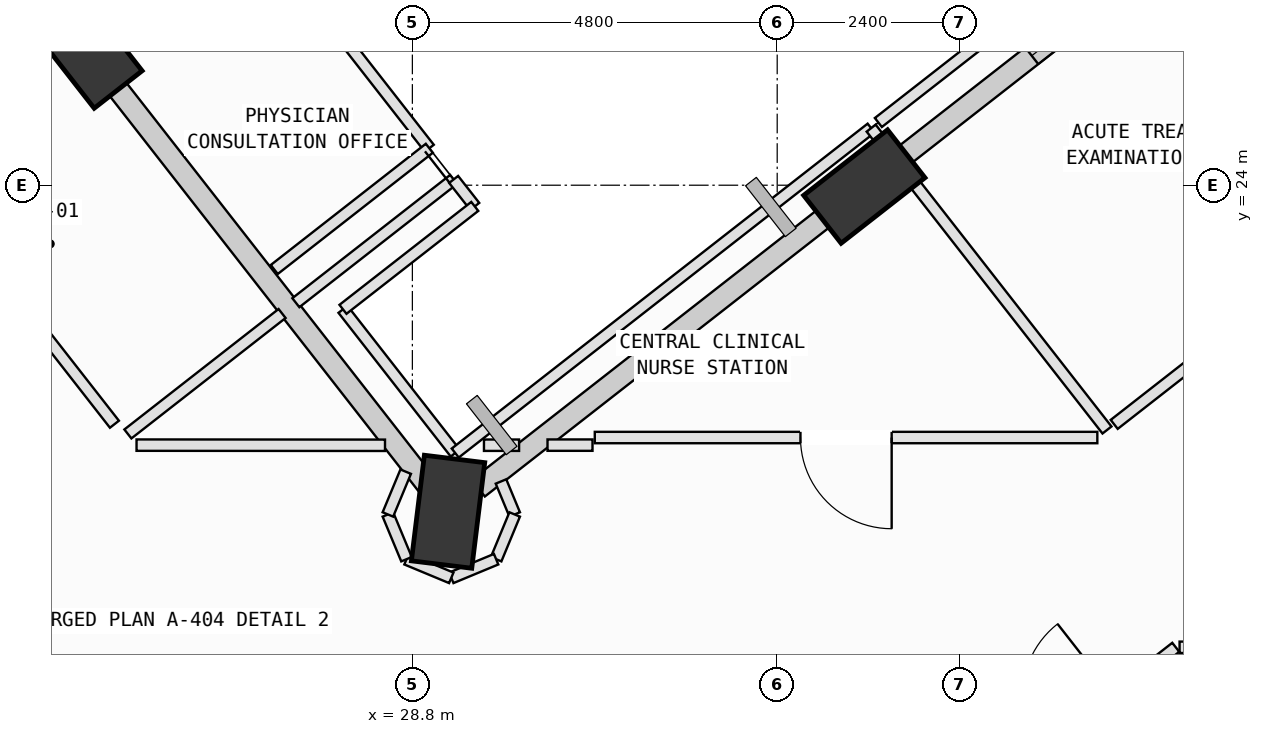
"""IFC4 building model, lengths in metres.
Left out: names, types, materials, properties, quantities, classifications, styles, units other than length and angle.
Written with IfcOpenShell. Run it as: python <this file> out.ifc"""

import sys

from ifc_helpers import new_model, si_unit, direction, frame, frame_2d, origin, origin_2d, place, context, subcontext, project, spatial, rectangle, extrude, element, fill, save


model = new_model("IFC4")
c1 = context("Model", 3, precision=1e-05, world=origin(), true_north=direction((0.0, 1.0)))
c2 = subcontext(c1, "Body", "Model", "MODEL_VIEW")
j1 = project(units=[si_unit("LENGTHUNIT", "METRE"), si_unit("PLANEANGLEUNIT", "RADIAN")], contexts=[c1])
p1 = place(None, origin())
s1 = spatial("IfcSite", under=j1, at=p1, CompositionType="ELEMENT")
p2 = place(p1, origin())
s2 = spatial("IfcBuilding", under=s1, at=p2, CompositionType="ELEMENT")
p3 = place(p2, frame((0.0, 0.0, 185.8)))
s3 = spatial("IfcBuildingStorey", under=s2, at=p3, CompositionType="ELEMENT", Elevation=185.8)
p4 = place(p3, frame((34.746, 23.982, 0.002), z_axis=(0.003359952663, 0.004765023776, 0.999983002489), x_axis=(-0.99879049006, -0.049037451332, 0.003589614403)))
e1 = element("IfcColumn", 1, at=p4, inside=s3, PredefinedType="COLUMN", context=c2, shape_type="SweptSolid", body=[
    extrude(rectangle(XDim=1.4, YDim=0.8, at=origin_2d()), origin(), (0.0, 0.0, 1.0), 3.996),
])
p5 = place(p3, frame((29.27, 19.704, 0.002), z_axis=(0.021251539031, -0.0177706835, 0.999616213802), x_axis=(-0.682948414235, 0.729948927181, 0.027495948803)))
e2 = element("IfcColumn", 2, at=p5, inside=s3, PredefinedType="COLUMN", context=c2, shape_type="SweptSolid", body=[
    extrude(rectangle(XDim=1.4, YDim=0.8, at=origin_2d()), origin(), (0.0, 0.0, 1.0), 3.998),
])
p6 = place(p3, frame((24.498, 25.811, 0.002), z_axis=(-0.003845969984, -0.037727134127, 0.99928067722), x_axis=(-0.532627653931, 0.845821943945, 0.029883463813)))
e3 = element("IfcColumn", 3, at=p6, inside=s3, PredefinedType="COLUMN", context=c2, shape_type="SweptSolid", body=[
    extrude(rectangle(XDim=1.4, YDim=0.8, at=origin_2d()), origin(), (0.0, 0.0, 1.0), 3.999),
])
p7 = place(p3, frame((35.146, 24.295, 0.0), z_axis=(0.0, 0.0, 1.0), x_axis=(0.787999939923, 0.615675315959, 0.0)))
e4 = element("IfcWall", 4, at=p7, inside=s3, PredefinedType="SOLIDWALL", context=c2, shape_type="SweptSolid", body=[
    extrude(rectangle(XDim=6.211, YDim=0.28, at=frame_2d((3.105, 0.0))), origin(), (0.0, 0.0, 1.0), 3.265),
])
p8 = place(p7, frame((2.288, 0.0, 0.75)))
e5 = element("IfcOpeningElement", 5, at=p8, cuts=e4, PredefinedType="OPENING", context=c2, shape_type="SweptSolid", body=[
    extrude(rectangle(XDim=2.0, YDim=1.95, at=frame_2d((1.0, 0.975))), frame((0.0, 0.15, 0.0), z_axis=(0.0, -1.0, 0.0), x_axis=(1.0, 0.0, 0.0)), (0.0, 0.0, 1.0), 0.3),
])
p9 = place(p3, frame((29.667, 20.014, 0.0), z_axis=(0.0, 0.0, 1.0), x_axis=(0.788002637329, 0.615671863547, 0.0)))
e6 = element("IfcWall", 6, at=p9, inside=s3, PredefinedType="SOLIDWALL", context=c2, shape_type="SweptSolid", body=[
    extrude(rectangle(XDim=5.96, YDim=0.28, at=frame_2d((2.98, 0.0))), origin(), (0.0, 0.0, 1.0), 3.265),
])
p10 = place(p3, frame((28.998, 20.052, 0.0), z_axis=(0.0, 0.0, 1.0), x_axis=(-0.615664366432, 0.788008494819, 0.0)))
e7 = element("IfcWall", 7, at=p10, inside=s3, PredefinedType="SOLIDWALL", context=c2, shape_type="SweptSolid", body=[
    extrude(rectangle(XDim=6.76, YDim=0.28, at=frame_2d((3.38, 0.0))), origin(), (0.0, 0.0, 1.0), 3.265),
])
p11 = place(p3, frame((35.726, 15.484, 0.0), z_axis=(0.0, 0.0, 1.0), x_axis=(0.788004728752, 0.615669186711, 0.0)))
e8 = element("IfcWall", 8, at=p11, inside=s3, PredefinedType="PARTITIONING", context=c2, shape_type="SweptSolid", body=[
    extrude(rectangle(XDim=3.957, YDim=0.15, at=frame_2d((1.979, 0.0))), origin(), (0.0, 0.0, 1.0), 3.78),
])
p12 = place(p11, frame((1.72, 0.0, 0.0)))
e9 = element("IfcOpeningElement", 9, at=p12, cuts=e8, PredefinedType="OPENING", context=c2, shape_type="SweptSolid", body=[
    extrude(rectangle(XDim=1.2, YDim=2.15, at=frame_2d((0.6, 1.075))), frame((0.0, 0.085, 0.0), z_axis=(0.0, -1.0, 0.0), x_axis=(1.0, 0.0, 0.0)), (0.0, 0.0, 1.0), 0.17),
])
p13 = place(p3, frame((38.894, 17.92, 0.0), z_axis=(0.0, 0.0, 1.0), x_axis=(1.0, 0.0, 0.0)))
e10 = element("IfcWall", 10, at=p13, inside=s3, PredefinedType="PARTITIONING", context=c2, shape_type="SweptSolid", body=[
    extrude(rectangle(XDim=2.296, YDim=0.15, at=frame_2d((1.148, 0.0))), origin(), (0.0, 0.0, 1.0), 3.78),
])
p14 = place(p3, frame((27.887, 22.367, 0.0), z_axis=(0.0, 0.0, 1.0), x_axis=(0.615594676938, -0.788062937667, 0.0)))
e11 = element("IfcWall", 11, at=p14, inside=s3, PredefinedType="PARTITIONING", context=c2, shape_type="SweptSolid", body=[
    extrude(rectangle(XDim=2.399, YDim=0.15, at=frame_2d((1.2, 0.0))), origin(), (0.0, 0.0, 1.0), 3.78),
])
p15 = place(p3, frame((29.364, 20.476, 0.0), z_axis=(0.0, 0.0, 1.0), x_axis=(0.788027038921, 0.615640630505, 0.0)))
e12 = element("IfcWall", 12, at=p15, inside=s3, PredefinedType="PARTITIONING", context=c2, shape_type="SweptSolid", body=[
    extrude(rectangle(XDim=6.944, YDim=0.15, at=frame_2d((3.472, 0.0))), origin(), (0.0, 0.0, 1.0), 3.78),
])
p16 = place(p3, frame((34.836, 24.751, 0.0), z_axis=(0.0, 0.0, 1.0), x_axis=(0.615763745793, -0.787930840472, 0.0)))
e13 = element("IfcWall", 13, at=p16, inside=s3, PredefinedType="PARTITIONING", context=c2, shape_type="SweptSolid", body=[
    extrude(rectangle(XDim=0.435, YDim=0.15, at=frame_2d((0.218, 0.0))), origin(), (0.0, 0.0, 1.0), 3.78),
])
p17 = place(p3, frame((35.246, 24.227, 0.0), z_axis=(0.0, 0.0, 1.0), x_axis=(0.615519498699, -0.78812165731, 0.0)))
e14 = element("IfcWall", 14, at=p17, inside=s3, PredefinedType="PARTITIONING", context=c2, shape_type="SweptSolid", body=[
    extrude(rectangle(XDim=4.375, YDim=0.15, at=frame_2d((2.188, 0.0))), origin(), (0.0, 0.0, 1.0), 3.78),
])
p18 = place(p3, frame((37.812, 20.68, 0.0), z_axis=(0.0, 0.0, 1.0), x_axis=(-1.0, 0.0, 0.0)))
e15 = element("IfcWall", 15, at=p18, inside=s3, PredefinedType="PARTITIONING", context=c2, shape_type="SweptSolid", body=[
    extrude(rectangle(XDim=6.612, YDim=0.15, at=frame_2d((3.306, 0.0))), origin(), (0.0, 0.0, 1.0), 3.415),
])
p19 = place(p18, frame((2.706, 0.0, 0.0)))
e16 = element("IfcOpeningElement", 16, at=p19, cuts=e15, PredefinedType="OPENING", context=c2, shape_type="SweptSolid", body=[
    extrude(rectangle(XDim=1.2, YDim=2.15, at=frame_2d((0.6, 1.075))), frame((0.0, 0.085, 0.0), z_axis=(0.0, -1.0, 0.0), x_axis=(1.0, 0.0, 0.0)), (0.0, 0.0, 1.0), 0.17),
])
p20 = place(p3, frame((31.17, 20.58, 0.0), z_axis=(0.0, 0.0, 1.0), x_axis=(-1.0, 0.0, 0.0)))
e17 = element("IfcWall", 17, at=p20, inside=s3, PredefinedType="PARTITIONING", context=c2, shape_type="SweptSolid", body=[
    extrude(rectangle(XDim=0.592, YDim=0.15, at=frame_2d((0.296, 0.0))), origin(), (0.0, 0.0, 1.0), 3.78),
])
p21 = place(p3, frame((30.204, 20.579, 0.0), z_axis=(0.0, 0.0, 1.0), x_axis=(-1.0, 0.0, 0.0)))
e18 = element("IfcWall", 18, at=p21, inside=s3, PredefinedType="PARTITIONING", context=c2, shape_type="SweptSolid", body=[
    extrude(rectangle(XDim=0.462, YDim=0.15, at=frame_2d((0.231, 0.0))), origin(), (0.0, 0.0, 1.0), 3.78),
])
p22 = place(p3, frame((29.966, 20.102, 0.0), z_axis=(0.0, 0.0, 1.0), x_axis=(0.382917701472, -0.923782460268, 0.0)))
e19 = element("IfcWall", 19, at=p22, inside=s3, PredefinedType="PARTITIONING", context=c2, shape_type="SweptSolid", body=[
    extrude(rectangle(XDim=0.47, YDim=0.15, at=frame_2d((0.235, 0.0))), origin(), (0.0, 0.0, 1.0), 3.78),
])
p23 = place(p3, frame((30.146, 19.668, 0.0), z_axis=(0.0, 0.0, 1.0), x_axis=(-0.382656259044, -0.923890787601, 0.0)))
e20 = element("IfcWall", 20, at=p23, inside=s3, PredefinedType="PARTITIONING", context=c2, shape_type="SweptSolid", body=[
    extrude(rectangle(XDim=0.637, YDim=0.15, at=frame_2d((0.319, 0.0))), origin(), (0.0, 0.0, 1.0), 3.78),
])
p24 = place(p3, frame((29.902, 19.079, 0.0), z_axis=(0.0, 0.0, 1.0), x_axis=(-0.923494633817, -0.383611341478, 0.0)))
e21 = element("IfcWall", 21, at=p24, inside=s3, PredefinedType="PARTITIONING", context=c2, shape_type="SweptSolid", body=[
    extrude(rectangle(XDim=0.639, YDim=0.15, at=frame_2d((0.319, 0.0))), origin(), (0.0, 0.0, 1.0), 3.415),
])
p25 = place(p3, frame((29.312, 18.834, 0.0), z_axis=(0.0, 0.0, 1.0), x_axis=(-0.92326925104, 0.384153472045, 0.0)))
e22 = element("IfcWall", 22, at=p25, inside=s3, PredefinedType="PARTITIONING", context=c2, shape_type="SweptSolid", body=[
    extrude(rectangle(XDim=0.638, YDim=0.15, at=frame_2d((0.319, 0.0))), origin(), (0.0, 0.0, 1.0), 3.78),
])
p26 = place(p3, frame((28.723, 19.079, 0.0), z_axis=(0.0, 0.0, 1.0), x_axis=(-0.383962918333, 0.92334851348, 0.0)))
e23 = element("IfcWall", 23, at=p26, inside=s3, PredefinedType="PARTITIONING", context=c2, shape_type="SweptSolid", body=[
    extrude(rectangle(XDim=0.638, YDim=0.15, at=frame_2d((0.319, 0.0))), origin(), (0.0, 0.0, 1.0), 3.78),
])
p27 = place(p3, frame((28.478, 19.668, 0.0), z_axis=(0.0, 0.0, 1.0), x_axis=(0.383648363286, 0.923479254422, 0.0)))
e24 = element("IfcWall", 24, at=p27, inside=s3, PredefinedType="PARTITIONING", context=c2, shape_type="SweptSolid", body=[
    extrude(rectangle(XDim=0.61, YDim=0.15, at=frame_2d((0.305, 0.0))), origin(), (0.0, 0.0, 1.0), 3.78),
])
p28 = place(p3, frame((28.44, 20.578, 0.0), z_axis=(0.0, 0.0, 1.0), x_axis=(-0.999999774112, 0.000672143239, 0.0)))
e25 = element("IfcWall", 25, at=p28, inside=s3, PredefinedType="PARTITIONING", context=c2, shape_type="SweptSolid", body=[
    extrude(rectangle(XDim=3.269, YDim=0.15, at=frame_2d((1.635, 0.0))), origin(), (0.0, 0.0, 1.0), 3.78),
])
p29 = place(p3, frame((25.057, 20.727, 0.0), z_axis=(0.0, 0.0, 1.0), x_axis=(0.788068936461, 0.615586997414, 0.0)))
e26 = element("IfcWall", 26, at=p29, inside=s3, PredefinedType="PARTITIONING", context=c2, shape_type="SweptSolid", body=[
    extrude(rectangle(XDim=2.575, YDim=0.15, at=frame_2d((1.287, 0.0))), origin(), (0.0, 0.0, 1.0), 3.78),
])
p30 = place(p3, frame((27.267, 22.454, 0.0), z_axis=(0.0, 0.0, 1.0), x_axis=(0.788022968691, 0.615645840411, 0.0)))
e27 = element("IfcWall", 27, at=p30, inside=s3, PredefinedType="PARTITIONING", context=c2, shape_type="SweptSolid", body=[
    extrude(rectangle(XDim=2.634, YDim=0.15, at=frame_2d((1.317, 0.0))), origin(), (0.0, 0.0, 1.0), 3.78),
])
p31 = place(p3, frame((29.343, 24.076, 0.0), z_axis=(0.0, 0.0, 1.0), x_axis=(0.616673159564, -0.787219292366, 0.0)))
e28 = element("IfcWall", 28, at=p31, inside=s3, PredefinedType="PARTITIONING", context=c2, shape_type="SweptSolid", body=[
    extrude(rectangle(XDim=0.451, YDim=0.15, at=frame_2d((0.226, 0.0))), origin(), (0.0, 0.0, 1.0), 3.78),
])
p32 = place(p3, frame((29.621, 23.721, 0.0), z_axis=(0.0, 0.0, 1.0), x_axis=(-0.788197623087, -0.615422218449, 0.0)))
e29 = element("IfcWall", 29, at=p32, inside=s3, PredefinedType="PARTITIONING", context=c2, shape_type="SweptSolid", body=[
    extrude(rectangle(XDim=2.2, YDim=0.15, at=frame_2d((1.1, 0.0))), origin(), (0.0, 0.0, 1.0), 3.78),
])
p33 = place(p3, frame((46.566, 27.519, 0.0), z_axis=(0.0, 0.0, 1.0), x_axis=(-0.788006255186, -0.615667232998, 0.0)))
e30 = element("IfcWall", 30, at=p33, inside=s3, PredefinedType="PARTITIONING", context=c2, shape_type="SweptSolid", body=[
    extrude(rectangle(XDim=10.827, YDim=0.15, at=frame_2d((5.414, 0.0))), origin(), (0.0, 0.0, 1.0), 3.065),
])
p34 = place(p33, frame((4.814, 0.0, 0.0)))
e31 = element("IfcOpeningElement", 31, at=p34, cuts=e30, PredefinedType="OPENING", context=c2, shape_type="SweptSolid", body=[
    extrude(rectangle(XDim=1.2, YDim=2.15, at=frame_2d((0.6, 1.075))), frame((0.0, 0.085, 0.0), z_axis=(0.0, -1.0, 0.0), x_axis=(1.0, 0.0, 0.0)), (0.0, 0.0, 1.0), 0.17),
])
p35 = place(p3, frame((34.931, 24.825, 0.0), z_axis=(0.0, 0.0, 1.0), x_axis=(0.788048984309, 0.615612539127, 0.0)))
e32 = element("IfcWall", 32, at=p35, inside=s3, PredefinedType="PARTITIONING", context=c2, shape_type="SweptSolid", body=[
    extrude(rectangle(XDim=10.828, YDim=0.15, at=frame_2d((5.414, 0.0))), origin(), (0.0, 0.0, 1.0), 3.265),
])
p36 = place(p3, frame((21.937, 24.622, 0.0), z_axis=(0.0, 0.0, 1.0), x_axis=(0.788163411112, 0.615466032681, 0.0)))
e33 = element("IfcWall", 33, at=p36, inside=s3, PredefinedType="PARTITIONING", context=c2, shape_type="SweptSolid", body=[
    extrude(rectangle(XDim=2.635, YDim=0.15, at=frame_2d((1.317, 0.0))), origin(), (0.0, 0.0, 1.0), 3.78),
])
p37 = place(p3, frame((24.88, 20.855, 0.0), z_axis=(0.0, 0.0, 1.0), x_axis=(-0.61562223779, 0.788041407756, 0.0)))
e34 = element("IfcWall", 34, at=p37, inside=s3, PredefinedType="PARTITIONING", context=c2, shape_type="SweptSolid", body=[
    extrude(rectangle(XDim=4.78, YDim=0.15, at=frame_2d((2.39, 0.0))), origin(), (0.0, 0.0, 1.0), 3.415),
])
p38 = place(p37, frame((1.89, 0.0, 0.0)))
e35 = element("IfcOpeningElement", 35, at=p38, cuts=e34, PredefinedType="OPENING", context=c2, shape_type="SweptSolid", body=[
    extrude(rectangle(XDim=1.0, YDim=2.12, at=frame_2d((0.5, 1.06))), frame((0.0, 0.085, 0.0), z_axis=(0.0, -1.0, 0.0), x_axis=(1.0, 0.0, 0.0)), (0.0, 0.0, 1.0), 0.17),
])
p39 = place(p3, frame((25.188, 29.395, 0.0), z_axis=(0.0, 0.0, 1.0), x_axis=(0.615629591414, -0.78803566301, 0.0)))
e36 = element("IfcWall", 36, at=p39, inside=s3, PredefinedType="PARTITIONING", context=c2, shape_type="SweptSolid", body=[
    extrude(rectangle(XDim=6.229, YDim=0.15, at=frame_2d((3.115, 0.0))), origin(), (0.0, 0.0, 1.0), 3.78),
])
p40 = place(p3, frame((29.023, 24.486, 0.0), z_axis=(0.0, 0.0, 1.0), x_axis=(-0.787801343925, -0.615929413578, 0.0)))
e37 = element("IfcWall", 37, at=p40, inside=s3, PredefinedType="PARTITIONING", context=c2, shape_type="SweptSolid", body=[
    extrude(rectangle(XDim=2.59, YDim=0.15, at=frame_2d((1.295, 0.0))), origin(), (0.0, 0.0, 1.0), 3.78),
])
p41 = place(p8, origin())
e38 = element("IfcWindow", 38, at=p41, inside=s3, PartitioningType="SINGLE_PANEL", PredefinedType="WINDOW", context=c2, shape_type="SweptSolid", body=[
    extrude(rectangle(XDim=2.0, YDim=1.95, at=frame_2d((1.0, 0.975))), frame((0.0, 0.03, 0.0), z_axis=(0.0, -1.0, 0.0), x_axis=(1.0, 0.0, 0.0)), (0.0, 0.0, 1.0), 0.06),
])
fill(e5, e38)
p42 = place(p19, origin())
e39 = element("IfcDoor", 39, at=p42, inside=s3, OperationType="SINGLE_SWING_LEFT", PredefinedType="DOOR", context=c2, shape_type="SweptSolid", body=[
    extrude(rectangle(XDim=1.2, YDim=2.15, at=frame_2d((0.6, 1.075))), frame((0.0, 0.025, 0.0), z_axis=(0.0, -1.0, 0.0), x_axis=(1.0, 0.0, 0.0)), (0.0, 0.0, 1.0), 0.05),
])
fill(e16, e39)
save(model, sys.argv[1])
